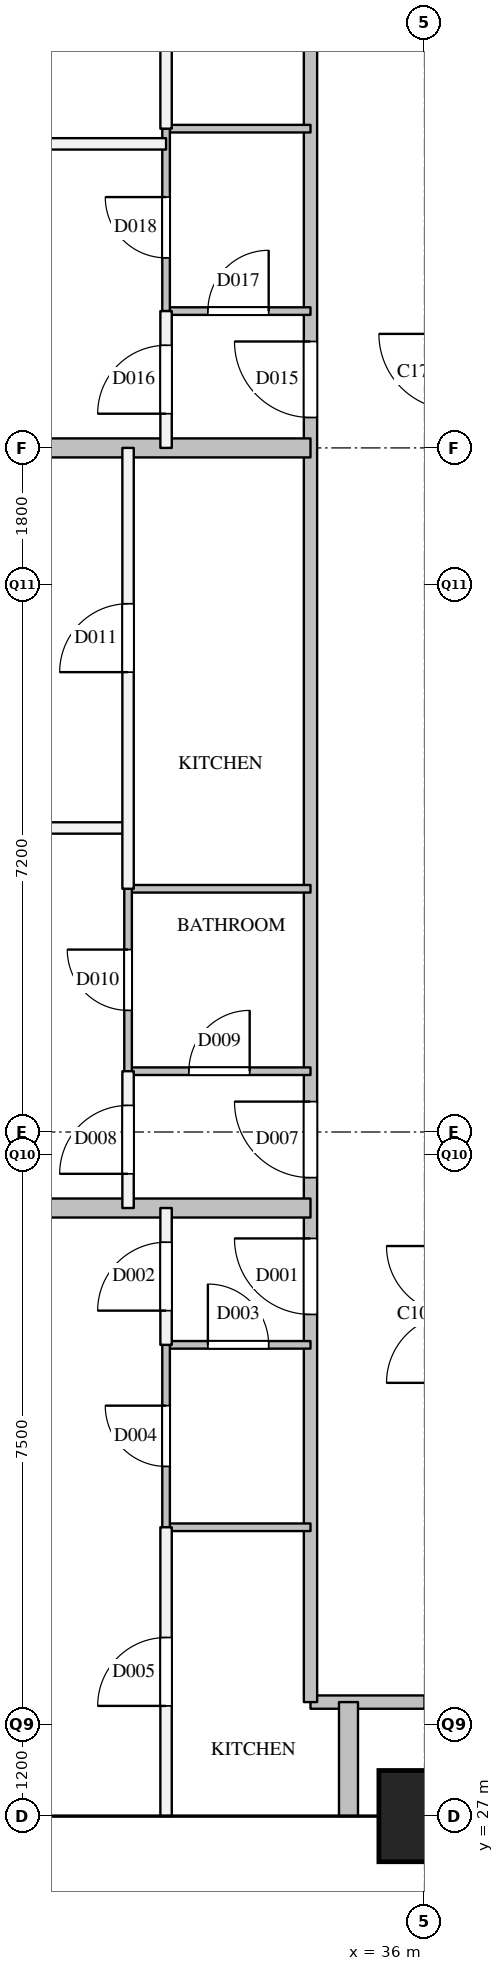
"""IFC4 building model, lengths in metres.
Left out: names, types, materials, properties, quantities, classifications, styles, units other than length and angle.
Written with IfcOpenShell. Run it as: python <this file> out.ifc"""

import sys

from ifc_helpers import new_model, si_unit, direction, frame, frame_2d, origin, origin_2d, place, context, subcontext, project, spatial, rectangle, extrude, element, fill, save


model = new_model("IFC4")
c1 = context("Model", 3, precision=1e-05, world=origin(), true_north=direction((0.0, 1.0)))
c2 = subcontext(c1, "Body", "Model", "MODEL_VIEW")
j1 = project(units=[si_unit("LENGTHUNIT", "METRE"), si_unit("PLANEANGLEUNIT", "RADIAN")], contexts=[c1])
p1 = place(None, origin())
s1 = spatial("IfcSite", under=j1, at=p1, CompositionType="ELEMENT")
p2 = place(p1, origin())
s2 = spatial("IfcBuilding", under=s1, at=p2, CompositionType="ELEMENT")
p3 = place(p2, frame((0.0, 0.0, 238.4)))
s3 = spatial("IfcBuildingStorey", under=s2, at=p3, CompositionType="ELEMENT", Elevation=238.4)
p4 = place(p3, frame((36.0, 27.0, 0.0), z_axis=(0.0, 0.0, 1.0), x_axis=(1.0, 0.0, 0.0)))
e1 = element("IfcColumn", 1, at=p4, inside=s3, PredefinedType="COLUMN", context=c2, shape_type="SweptSolid", body=[
    extrude(rectangle(XDim=1.2, YDim=1.2, at=origin_2d()), origin(), (0.0, 0.0, 1.0), 3.9),
])
p5 = place(p3, frame((34.5, 28.5, 0.0), z_axis=(0.0, 0.0, 1.0), x_axis=(1.0, 0.0, 0.0)))
e2 = element("IfcWall", 2, at=p5, inside=s3, PredefinedType="PARTITIONING", context=c2, shape_type="SweptSolid", body=[
    extrude(rectangle(XDim=1.5, YDim=0.175, at=frame_2d((0.75, 0.0))), origin(), (0.0, 0.0, 1.0), 3.6),
])
p6 = place(p3, frame((34.5, 28.5, 0.0), z_axis=(0.0, 0.0, 1.0), x_axis=(0.0, 1.0, 0.0)))
e3 = element("IfcWall", 3, at=p6, inside=s3, PredefinedType="PARTITIONING", context=c2, shape_type="SweptSolid", body=[
    extrude(rectangle(XDim=23.0, YDim=0.175, at=frame_2d((11.5, 0.0))), origin(), (0.0, 0.0, 1.0), 3.6),
])
p7 = place(p6, frame((5.1, 0.0, 0.0)))
e4 = element("IfcOpeningElement", 4, at=p7, cuts=e3, PredefinedType="OPENING", context=c2, shape_type="SweptSolid", body=[
    extrude(rectangle(XDim=1.0, YDim=2.1, at=frame_2d((0.5, 1.05))), frame((0.0, 0.097, 0.0), z_axis=(0.0, -1.0, 0.0), x_axis=(1.0, 0.0, 0.0)), (0.0, 0.0, 1.0), 0.195),
])
p8 = place(p6, frame((6.9, 0.0, 0.0)))
e5 = element("IfcOpeningElement", 5, at=p8, cuts=e3, PredefinedType="OPENING", context=c2, shape_type="SweptSolid", body=[
    extrude(rectangle(XDim=1.0, YDim=2.1, at=frame_2d((0.5, 1.05))), frame((0.0, 0.097, 0.0), z_axis=(0.0, -1.0, 0.0), x_axis=(1.0, 0.0, 0.0)), (0.0, 0.0, 1.0), 0.195),
])
p9 = place(p6, frame((16.9, 0.0, 0.0)))
e6 = element("IfcOpeningElement", 6, at=p9, cuts=e3, PredefinedType="OPENING", context=c2, shape_type="SweptSolid", body=[
    extrude(rectangle(XDim=1.0, YDim=2.1, at=frame_2d((0.5, 1.05))), frame((0.0, 0.097, 0.0), z_axis=(0.0, -1.0, 0.0), x_axis=(1.0, 0.0, 0.0)), (0.0, 0.0, 1.0), 0.195),
])
p10 = place(p3, frame((18.0, 40.0, 0.0), z_axis=(0.0, 0.0, 1.0), x_axis=(1.0, 0.0, 0.0)))
e7 = element("IfcWall", 7, at=p10, inside=s3, PredefinedType="PARTITIONING", context=c2, shape_type="SweptSolid", body=[
    extrude(rectangle(XDim=14.1, YDim=0.15, at=frame_2d((7.05, 0.0))), origin(), (0.0, 0.0, 1.0), 2.6),
])
p11 = place(p10, frame((9.914, 0.0, 0.0)))
e8 = element("IfcOpeningElement", 8, at=p11, cuts=e7, PredefinedType="OPENING", context=c2, shape_type="SweptSolid", body=[
    extrude(rectangle(XDim=0.9, YDim=2.1, at=frame_2d((0.45, 1.05))), frame((0.0, 0.085, 0.0), z_axis=(0.0, -1.0, 0.0), x_axis=(1.0, 0.0, 0.0)), (0.0, 0.0, 1.0), 0.17),
])
p12 = place(p10, frame((2.864, 0.0, 0.0)))
e9 = element("IfcOpeningElement", 9, at=p12, cuts=e7, PredefinedType="OPENING", context=c2, shape_type="SweptSolid", body=[
    extrude(rectangle(XDim=0.9, YDim=2.1, at=frame_2d((0.45, 1.05))), frame((0.0, 0.085, 0.0), z_axis=(0.0, -1.0, 0.0), x_axis=(1.0, 0.0, 0.0)), (0.0, 0.0, 1.0), 0.17),
])
p13 = place(p3, frame((18.0, 49.0, 0.0), z_axis=(0.0, 0.0, 1.0), x_axis=(1.0, 0.0, 0.0)))
e10 = element("IfcWall", 10, at=p13, inside=s3, PredefinedType="PARTITIONING", context=c2, shape_type="SweptSolid", body=[
    extrude(rectangle(XDim=14.6, YDim=0.15, at=frame_2d((7.3, 0.0))), origin(), (0.0, 0.0, 1.0), 2.6),
])
p14 = place(p13, frame((10.533, 0.0, 0.0)))
e11 = element("IfcOpeningElement", 11, at=p14, cuts=e10, PredefinedType="OPENING", context=c2, shape_type="SweptSolid", body=[
    extrude(rectangle(XDim=0.9, YDim=2.1, at=frame_2d((0.45, 1.05))), frame((0.0, 0.085, 0.0), z_axis=(0.0, -1.0, 0.0), x_axis=(1.0, 0.0, 0.0)), (0.0, 0.0, 1.0), 0.17),
])
p15 = place(p13, frame((3.233, 0.0, 0.0)))
e12 = element("IfcOpeningElement", 12, at=p15, cuts=e10, PredefinedType="OPENING", context=c2, shape_type="SweptSolid", body=[
    extrude(rectangle(XDim=0.9, YDim=2.1, at=frame_2d((0.45, 1.05))), frame((0.0, 0.085, 0.0), z_axis=(0.0, -1.0, 0.0), x_axis=(1.0, 0.0, 0.0)), (0.0, 0.0, 1.0), 0.17),
])
p16 = place(p3, frame((32.1, 35.0, 0.0), z_axis=(0.0, 0.0, 1.0), x_axis=(0.0, 1.0, 0.0)))
e13 = element("IfcWall", 13, at=p16, inside=s3, PredefinedType="PARTITIONING", context=c2, shape_type="SweptSolid", body=[
    extrude(rectangle(XDim=1.8, YDim=0.15, at=frame_2d((0.9, 0.0))), origin(), (0.0, 0.0, 1.0), 3.6),
])
p17 = place(p16, frame((0.45, 0.0, 0.0)))
e14 = element("IfcOpeningElement", 14, at=p17, cuts=e13, PredefinedType="OPENING", context=c2, shape_type="SweptSolid", body=[
    extrude(rectangle(XDim=0.9, YDim=2.1, at=frame_2d((0.45, 1.05))), frame((0.0, 0.085, 0.0), z_axis=(0.0, -1.0, 0.0), x_axis=(1.0, 0.0, 0.0)), (0.0, 0.0, 1.0), 0.17),
])
p18 = place(p3, frame((32.1, 39.2, 0.0), z_axis=(0.0, 0.0, 1.0), x_axis=(0.0, 1.0, 0.0)))
e15 = element("IfcWall", 15, at=p18, inside=s3, PredefinedType="PARTITIONING", context=c2, shape_type="SweptSolid", body=[
    extrude(rectangle(XDim=5.8, YDim=0.15, at=frame_2d((2.9, 0.0))), origin(), (0.0, 0.0, 1.0), 3.6),
])
p19 = place(p18, frame((2.85, 0.0, 0.0)))
e16 = element("IfcOpeningElement", 16, at=p19, cuts=e15, PredefinedType="OPENING", context=c2, shape_type="SweptSolid", body=[
    extrude(rectangle(XDim=0.9, YDim=2.1, at=frame_2d((0.45, 1.05))), frame((0.0, 0.085, 0.0), z_axis=(0.0, -1.0, 0.0), x_axis=(1.0, 0.0, 0.0)), (0.0, 0.0, 1.0), 0.17),
])
p20 = place(p3, frame((32.6, 27.0, 0.0), z_axis=(0.0, 0.0, 1.0), x_axis=(0.0, 1.0, 0.0)))
e17 = element("IfcWall", 17, at=p20, inside=s3, PredefinedType="PARTITIONING", context=c2, shape_type="SweptSolid", body=[
    extrude(rectangle(XDim=3.8, YDim=0.15, at=frame_2d((1.9, 0.0))), origin(), (0.0, 0.0, 1.0), 2.6),
])
p21 = place(p20, frame((1.45, 0.0, 0.0)))
e18 = element("IfcOpeningElement", 18, at=p21, cuts=e17, PredefinedType="OPENING", context=c2, shape_type="SweptSolid", body=[
    extrude(rectangle(XDim=0.9, YDim=2.1, at=frame_2d((0.45, 1.05))), frame((0.0, 0.085, 0.0), z_axis=(0.0, -1.0, 0.0), x_axis=(1.0, 0.0, 0.0)), (0.0, 0.0, 1.0), 0.17),
])
p22 = place(p3, frame((32.6, 33.2, 0.0), z_axis=(0.0, 0.0, 1.0), x_axis=(0.0, 1.0, 0.0)))
e19 = element("IfcWall", 19, at=p22, inside=s3, PredefinedType="PARTITIONING", context=c2, shape_type="SweptSolid", body=[
    extrude(rectangle(XDim=1.8, YDim=0.15, at=frame_2d((0.9, 0.0))), origin(), (0.0, 0.0, 1.0), 3.6),
])
p23 = place(p22, frame((0.45, 0.0, 0.0)))
e20 = element("IfcOpeningElement", 20, at=p23, cuts=e19, PredefinedType="OPENING", context=c2, shape_type="SweptSolid", body=[
    extrude(rectangle(XDim=0.9, YDim=2.1, at=frame_2d((0.45, 1.05))), frame((0.0, 0.085, 0.0), z_axis=(0.0, -1.0, 0.0), x_axis=(1.0, 0.0, 0.0)), (0.0, 0.0, 1.0), 0.17),
])
p24 = place(p3, frame((32.6, 45.0, 0.0), z_axis=(0.0, 0.0, 1.0), x_axis=(0.0, 1.0, 0.0)))
e21 = element("IfcWall", 21, at=p24, inside=s3, PredefinedType="PARTITIONING", context=c2, shape_type="SweptSolid", body=[
    extrude(rectangle(XDim=1.8, YDim=0.15, at=frame_2d((0.9, 0.0))), origin(), (0.0, 0.0, 1.0), 3.6),
])
p25 = place(p24, frame((0.45, 0.0, 0.0)))
e22 = element("IfcOpeningElement", 22, at=p25, cuts=e21, PredefinedType="OPENING", context=c2, shape_type="SweptSolid", body=[
    extrude(rectangle(XDim=0.9, YDim=2.1, at=frame_2d((0.45, 1.05))), frame((0.0, 0.085, 0.0), z_axis=(0.0, -1.0, 0.0), x_axis=(1.0, 0.0, 0.0)), (0.0, 0.0, 1.0), 0.17),
])
p26 = place(p3, frame((32.6, 49.2, 0.0), z_axis=(0.0, 0.0, 1.0), x_axis=(0.0, 1.0, 0.0)))
e23 = element("IfcWall", 23, at=p26, inside=s3, PredefinedType="PARTITIONING", context=c2, shape_type="SweptSolid", body=[
    extrude(rectangle(XDim=4.8, YDim=0.15, at=frame_2d((2.4, 0.0))), origin(), (0.0, 0.0, 1.0), 2.6),
])
p27 = place(p26, frame((1.95, 0.0, 0.0)))
e24 = element("IfcOpeningElement", 24, at=p27, cuts=e23, PredefinedType="OPENING", context=c2, shape_type="SweptSolid", body=[
    extrude(rectangle(XDim=0.9, YDim=2.1, at=frame_2d((0.45, 1.05))), frame((0.0, 0.085, 0.0), z_axis=(0.0, -1.0, 0.0), x_axis=(1.0, 0.0, 0.0)), (0.0, 0.0, 1.0), 0.17),
])
p28 = place(p3, frame((18.0, 35.0, 0.0), z_axis=(0.0, 0.0, 1.0), x_axis=(1.0, 0.0, 0.0)))
e25 = element("IfcWall", 25, at=p28, inside=s3, PredefinedType="PARTITIONING", context=c2, shape_type="SweptSolid", body=[
    extrude(rectangle(XDim=16.5, YDim=0.25, at=frame_2d((8.25, 0.0))), origin(), (0.0, 0.0, 1.0), 2.6),
])
p29 = place(p3, frame((18.0, 45.0, 0.0), z_axis=(0.0, 0.0, 1.0), x_axis=(1.0, 0.0, 0.0)))
e26 = element("IfcWall", 26, at=p29, inside=s3, PredefinedType="PARTITIONING", context=c2, shape_type="SweptSolid", body=[
    extrude(rectangle(XDim=16.5, YDim=0.25, at=frame_2d((8.25, 0.0))), origin(), (0.0, 0.0, 1.0), 3.6),
])
p30 = place(p3, frame((35.0, 27.0, 0.0), z_axis=(0.0, 0.0, 1.0), x_axis=(0.0, 1.0, 0.0)))
e27 = element("IfcWall", 27, at=p30, inside=s3, PredefinedType="PARTITIONING", context=c2, shape_type="SweptSolid", body=[
    extrude(rectangle(XDim=1.5, YDim=0.25, at=frame_2d((0.75, 0.0))), origin(), (0.0, 0.0, 1.0), 2.6),
])
p31 = place(p3, frame((32.6, 30.8, 0.0), z_axis=(0.0, 0.0, 1.0), x_axis=(1.0, 0.0, 0.0)))
e28 = element("IfcWall", 28, at=p31, inside=s3, PredefinedType="PARTITIONING", context=c2, shape_type="SweptSolid", body=[
    extrude(rectangle(XDim=1.9, YDim=0.1, at=frame_2d((0.95, 0.0))), origin(), (0.0, 0.0, 1.0), 3.6),
])
p32 = place(p3, frame((32.6, 33.2, 0.0), z_axis=(0.0, 0.0, 1.0), x_axis=(1.0, 0.0, 0.0)))
e29 = element("IfcWall", 29, at=p32, inside=s3, PredefinedType="PARTITIONING", context=c2, shape_type="SweptSolid", body=[
    extrude(rectangle(XDim=1.9, YDim=0.1, at=frame_2d((0.95, 0.0))), origin(), (0.0, 0.0, 1.0), 3.6),
])
p33 = place(p32, frame((0.55, 0.0, 0.0)))
e30 = element("IfcOpeningElement", 30, at=p33, cuts=e29, PredefinedType="OPENING", context=c2, shape_type="SweptSolid", body=[
    extrude(rectangle(XDim=0.8, YDim=2.1, at=frame_2d((0.4, 1.05))), frame((0.0, 0.06, 0.0), z_axis=(0.0, -1.0, 0.0), x_axis=(1.0, 0.0, 0.0)), (0.0, 0.0, 1.0), 0.12),
])
p34 = place(p3, frame((32.1, 36.8, 0.0), z_axis=(0.0, 0.0, 1.0), x_axis=(1.0, 0.0, 0.0)))
e31 = element("IfcWall", 31, at=p34, inside=s3, PredefinedType="PARTITIONING", context=c2, shape_type="SweptSolid", body=[
    extrude(rectangle(XDim=2.4, YDim=0.1, at=frame_2d((1.2, 0.0))), origin(), (0.0, 0.0, 1.0), 3.6),
])
p35 = place(p34, frame((0.8, 0.0, 0.0)))
e32 = element("IfcOpeningElement", 32, at=p35, cuts=e31, PredefinedType="OPENING", context=c2, shape_type="SweptSolid", body=[
    extrude(rectangle(XDim=0.8, YDim=2.1, at=frame_2d((0.4, 1.05))), frame((0.0, 0.06, 0.0), z_axis=(0.0, -1.0, 0.0), x_axis=(1.0, 0.0, 0.0)), (0.0, 0.0, 1.0), 0.12),
])
p36 = place(p3, frame((32.1, 39.2, 0.0), z_axis=(0.0, 0.0, 1.0), x_axis=(1.0, 0.0, 0.0)))
e33 = element("IfcWall", 33, at=p36, inside=s3, PredefinedType="PARTITIONING", context=c2, shape_type="SweptSolid", body=[
    extrude(rectangle(XDim=2.4, YDim=0.1, at=frame_2d((1.2, 0.0))), origin(), (0.0, 0.0, 1.0), 3.6),
])
p37 = place(p3, frame((32.6, 46.8, 0.0), z_axis=(0.0, 0.0, 1.0), x_axis=(1.0, 0.0, 0.0)))
e34 = element("IfcWall", 34, at=p37, inside=s3, PredefinedType="PARTITIONING", context=c2, shape_type="SweptSolid", body=[
    extrude(rectangle(XDim=1.9, YDim=0.1, at=frame_2d((0.95, 0.0))), origin(), (0.0, 0.0, 1.0), 3.6),
])
p38 = place(p37, frame((0.55, 0.0, 0.0)))
e35 = element("IfcOpeningElement", 35, at=p38, cuts=e34, PredefinedType="OPENING", context=c2, shape_type="SweptSolid", body=[
    extrude(rectangle(XDim=0.8, YDim=2.1, at=frame_2d((0.4, 1.05))), frame((0.0, 0.06, 0.0), z_axis=(0.0, -1.0, 0.0), x_axis=(1.0, 0.0, 0.0)), (0.0, 0.0, 1.0), 0.12),
])
p39 = place(p3, frame((32.6, 49.2, 0.0), z_axis=(0.0, 0.0, 1.0), x_axis=(1.0, 0.0, 0.0)))
e36 = element("IfcWall", 36, at=p39, inside=s3, PredefinedType="PARTITIONING", context=c2, shape_type="SweptSolid", body=[
    extrude(rectangle(XDim=1.9, YDim=0.1, at=frame_2d((0.95, 0.0))), origin(), (0.0, 0.0, 1.0), 3.6),
])
p40 = place(p3, frame((32.1, 36.8, 0.0), z_axis=(0.0, 0.0, 1.0), x_axis=(0.0, 1.0, 0.0)))
e37 = element("IfcWall", 37, at=p40, inside=s3, PredefinedType="PARTITIONING", context=c2, shape_type="SweptSolid", body=[
    extrude(rectangle(XDim=2.4, YDim=0.1, at=frame_2d((1.2, 0.0))), origin(), (0.0, 0.0, 1.0), 3.6),
])
p41 = place(p40, frame((0.8, 0.0, 0.0)))
e38 = element("IfcOpeningElement", 38, at=p41, cuts=e37, PredefinedType="OPENING", context=c2, shape_type="SweptSolid", body=[
    extrude(rectangle(XDim=0.8, YDim=2.1, at=frame_2d((0.4, 1.05))), frame((0.0, 0.06, 0.0), z_axis=(0.0, -1.0, 0.0), x_axis=(1.0, 0.0, 0.0)), (0.0, 0.0, 1.0), 0.12),
])
p42 = place(p3, frame((32.6, 30.8, 0.0), z_axis=(0.0, 0.0, 1.0), x_axis=(0.0, 1.0, 0.0)))
e39 = element("IfcWall", 39, at=p42, inside=s3, PredefinedType="PARTITIONING", context=c2, shape_type="SweptSolid", body=[
    extrude(rectangle(XDim=2.4, YDim=0.1, at=frame_2d((1.2, 0.0))), origin(), (0.0, 0.0, 1.0), 3.6),
])
p43 = place(p42, frame((0.8, 0.0, 0.0)))
e40 = element("IfcOpeningElement", 40, at=p43, cuts=e39, PredefinedType="OPENING", context=c2, shape_type="SweptSolid", body=[
    extrude(rectangle(XDim=0.8, YDim=2.1, at=frame_2d((0.4, 1.05))), frame((0.0, 0.06, 0.0), z_axis=(0.0, -1.0, 0.0), x_axis=(1.0, 0.0, 0.0)), (0.0, 0.0, 1.0), 0.12),
])
p44 = place(p3, frame((32.6, 46.8, 0.0), z_axis=(0.0, 0.0, 1.0), x_axis=(0.0, 1.0, 0.0)))
e41 = element("IfcWall", 41, at=p44, inside=s3, PredefinedType="PARTITIONING", context=c2, shape_type="SweptSolid", body=[
    extrude(rectangle(XDim=2.4, YDim=0.1, at=frame_2d((1.2, 0.0))), origin(), (0.0, 0.0, 1.0), 3.6),
])
p45 = place(p44, frame((0.7, 0.0, 0.0)))
e42 = element("IfcOpeningElement", 42, at=p45, cuts=e41, PredefinedType="OPENING", context=c2, shape_type="SweptSolid", body=[
    extrude(rectangle(XDim=0.8, YDim=2.1, at=frame_2d((0.4, 1.05))), frame((0.0, 0.06, 0.0), z_axis=(0.0, -1.0, 0.0), x_axis=(1.0, 0.0, 0.0)), (0.0, 0.0, 1.0), 0.12),
])
p46 = place(p7, origin())
e43 = element("IfcDoor", 43, at=p46, inside=s3, OperationType="SINGLE_SWING_RIGHT", PredefinedType="DOOR", context=c2, shape_type="SweptSolid", body=[
    extrude(rectangle(XDim=1.0, YDim=2.1, at=frame_2d((0.5, 1.05))), frame((0.0, 0.025, 0.0), z_axis=(0.0, -1.0, 0.0), x_axis=(1.0, 0.0, 0.0)), (0.0, 0.0, 1.0), 0.05),
])
fill(e4, e43)
p47 = place(p23, origin())
e44 = element("IfcDoor", 44, at=p47, inside=s3, OperationType="SINGLE_SWING_LEFT", PredefinedType="DOOR", context=c2, shape_type="SweptSolid", body=[
    extrude(rectangle(XDim=0.9, YDim=2.1, at=frame_2d((0.45, 1.05))), frame((0.0, 0.025, 0.0), z_axis=(0.0, -1.0, 0.0), x_axis=(1.0, 0.0, 0.0)), (0.0, 0.0, 1.0), 0.05),
])
fill(e20, e44)
p48 = place(p33, origin())
e45 = element("IfcDoor", 45, at=p48, inside=s3, OperationType="SINGLE_SWING_LEFT", PredefinedType="DOOR", context=c2, shape_type="SweptSolid", body=[
    extrude(rectangle(XDim=0.8, YDim=2.1, at=frame_2d((0.4, 1.05))), frame((0.0, 0.025, 0.0), z_axis=(0.0, -1.0, 0.0), x_axis=(1.0, 0.0, 0.0)), (0.0, 0.0, 1.0), 0.05),
])
fill(e30, e45)
p49 = place(p43, origin())
e46 = element("IfcDoor", 46, at=p49, inside=s3, OperationType="SINGLE_SWING_RIGHT", PredefinedType="DOOR", context=c2, shape_type="SweptSolid", body=[
    extrude(rectangle(XDim=0.8, YDim=2.1, at=frame_2d((0.4, 1.05))), frame((0.0, 0.025, 0.0), z_axis=(0.0, -1.0, 0.0), x_axis=(1.0, 0.0, 0.0)), (0.0, 0.0, 1.0), 0.05),
])
fill(e40, e46)
p50 = place(p21, origin())
e47 = element("IfcDoor", 47, at=p50, inside=s3, OperationType="SINGLE_SWING_LEFT", PredefinedType="DOOR", context=c2, shape_type="SweptSolid", body=[
    extrude(rectangle(XDim=0.9, YDim=2.1, at=frame_2d((0.45, 1.05))), frame((0.0, 0.025, 0.0), z_axis=(0.0, -1.0, 0.0), x_axis=(1.0, 0.0, 0.0)), (0.0, 0.0, 1.0), 0.05),
])
fill(e18, e47)
p51 = place(p8, origin())
e48 = element("IfcDoor", 48, at=p51, inside=s3, OperationType="SINGLE_SWING_RIGHT", PredefinedType="DOOR", context=c2, shape_type="SweptSolid", body=[
    extrude(rectangle(XDim=1.0, YDim=2.1, at=frame_2d((0.5, 1.05))), frame((0.0, 0.025, 0.0), z_axis=(0.0, -1.0, 0.0), x_axis=(1.0, 0.0, 0.0)), (0.0, 0.0, 1.0), 0.05),
])
fill(e5, e48)
p52 = place(p17, origin())
e49 = element("IfcDoor", 49, at=p52, inside=s3, OperationType="SINGLE_SWING_LEFT", PredefinedType="DOOR", context=c2, shape_type="SweptSolid", body=[
    extrude(rectangle(XDim=0.9, YDim=2.1, at=frame_2d((0.45, 1.05))), frame((0.0, 0.025, 0.0), z_axis=(0.0, -1.0, 0.0), x_axis=(1.0, 0.0, 0.0)), (0.0, 0.0, 1.0), 0.05),
])
fill(e14, e49)
p53 = place(p35, origin())
e50 = element("IfcDoor", 50, at=p53, inside=s3, OperationType="SINGLE_SWING_RIGHT", PredefinedType="DOOR", context=c2, shape_type="SweptSolid", body=[
    extrude(rectangle(XDim=0.8, YDim=2.1, at=frame_2d((0.4, 1.05))), frame((0.0, 0.025, 0.0), z_axis=(0.0, -1.0, 0.0), x_axis=(1.0, 0.0, 0.0)), (0.0, 0.0, 1.0), 0.05),
])
fill(e32, e50)
p54 = place(p41, origin())
e51 = element("IfcDoor", 51, at=p54, inside=s3, OperationType="SINGLE_SWING_RIGHT", PredefinedType="DOOR", context=c2, shape_type="SweptSolid", body=[
    extrude(rectangle(XDim=0.8, YDim=2.1, at=frame_2d((0.4, 1.05))), frame((0.0, 0.025, 0.0), z_axis=(0.0, -1.0, 0.0), x_axis=(1.0, 0.0, 0.0)), (0.0, 0.0, 1.0), 0.05),
])
fill(e38, e51)
p55 = place(p19, origin())
e52 = element("IfcDoor", 52, at=p55, inside=s3, OperationType="SINGLE_SWING_LEFT", PredefinedType="DOOR", context=c2, shape_type="SweptSolid", body=[
    extrude(rectangle(XDim=0.9, YDim=2.1, at=frame_2d((0.45, 1.05))), frame((0.0, 0.025, 0.0), z_axis=(0.0, -1.0, 0.0), x_axis=(1.0, 0.0, 0.0)), (0.0, 0.0, 1.0), 0.05),
])
fill(e16, e52)
p56 = place(p9, origin())
e53 = element("IfcDoor", 53, at=p56, inside=s3, OperationType="SINGLE_SWING_RIGHT", PredefinedType="DOOR", context=c2, shape_type="SweptSolid", body=[
    extrude(rectangle(XDim=1.0, YDim=2.1, at=frame_2d((0.5, 1.05))), frame((0.0, 0.025, 0.0), z_axis=(0.0, -1.0, 0.0), x_axis=(1.0, 0.0, 0.0)), (0.0, 0.0, 1.0), 0.05),
])
fill(e6, e53)
p57 = place(p25, origin())
e54 = element("IfcDoor", 54, at=p57, inside=s3, OperationType="SINGLE_SWING_LEFT", PredefinedType="DOOR", context=c2, shape_type="SweptSolid", body=[
    extrude(rectangle(XDim=0.9, YDim=2.1, at=frame_2d((0.45, 1.05))), frame((0.0, 0.025, 0.0), z_axis=(0.0, -1.0, 0.0), x_axis=(1.0, 0.0, 0.0)), (0.0, 0.0, 1.0), 0.05),
])
fill(e22, e54)
p58 = place(p38, origin())
e55 = element("IfcDoor", 55, at=p58, inside=s3, OperationType="SINGLE_SWING_RIGHT", PredefinedType="DOOR", context=c2, shape_type="SweptSolid", body=[
    extrude(rectangle(XDim=0.8, YDim=2.1, at=frame_2d((0.4, 1.05))), frame((0.0, 0.025, 0.0), z_axis=(0.0, -1.0, 0.0), x_axis=(1.0, 0.0, 0.0)), (0.0, 0.0, 1.0), 0.05),
])
fill(e35, e55)
p59 = place(p45, origin())
e56 = element("IfcDoor", 56, at=p59, inside=s3, OperationType="SINGLE_SWING_RIGHT", PredefinedType="DOOR", context=c2, shape_type="SweptSolid", body=[
    extrude(rectangle(XDim=0.8, YDim=2.1, at=frame_2d((0.4, 1.05))), frame((0.0, 0.025, 0.0), z_axis=(0.0, -1.0, 0.0), x_axis=(1.0, 0.0, 0.0)), (0.0, 0.0, 1.0), 0.05),
])
fill(e42, e56)
save(model, sys.argv[1])
